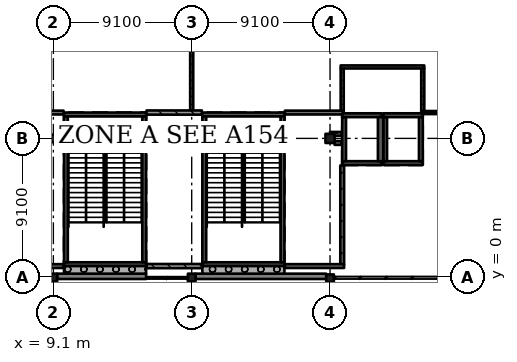
"""IFC4 building model, lengths in metres.
Left out: names, types, materials, properties, quantities, classifications, styles, units other than length and angle.
Written with IfcOpenShell. Run it as: python <this file> out.ifc"""

import sys

from ifc_helpers import new_model, si_unit, direction, frame, frame_2d, origin, origin_2d, place, context, subcontext, project, spatial, rectangle, extrude, element, fill, save


model = new_model("IFC4")
c1 = context("Model", 3, precision=1e-05, world=origin(), true_north=direction((0.0, 1.0)))
c2 = subcontext(c1, "Body", "Model", "MODEL_VIEW")
j1 = project(units=[si_unit("LENGTHUNIT", "METRE"), si_unit("PLANEANGLEUNIT", "RADIAN")], contexts=[c1])
p1 = place(None, origin())
s1 = spatial("IfcSite", under=j1, at=p1, CompositionType="ELEMENT")
p2 = place(p1, origin())
s2 = spatial("IfcBuilding", under=s1, at=p2, CompositionType="ELEMENT")
p3 = place(p2, frame((0.0, 0.0, 20.02)))
s3 = spatial("IfcBuildingStorey", under=s2, at=p3, CompositionType="ELEMENT", Elevation=20.02)
for number, where, z_axis, x_axis in (
    (1, (9.1, -0.05, 0.0), (0.0, 0.0, 1.0), (1.0, 0.0, 0.0)),
    (2, (9.1, 9.1, 0.0), (0.0, 0.0, 1.0), (1.0, 0.0, 0.0)),
    (3, (18.2, -0.05, 0.0), (0.0, 0.0, 1.0), (1.0, 0.0, 0.0)),
    (4, (18.2, 9.1, 0.0), (0.0, 0.0, 1.0), (1.0, 0.0, 0.0)),
    (5, (27.3, -0.1, 0.0), (0.0, 0.0, 1.0), (1.0, 0.0, 0.0)),
):
    element("IfcColumn", number, at=place(p3, frame(where, z_axis=z_axis, x_axis=x_axis)), inside=s3, PredefinedType="COLUMN", context=c2, shape_type="SweptSolid", body=[
        extrude(rectangle(XDim=0.5, YDim=0.5, at=origin_2d()), origin(), (0.0, 0.0, 1.0), 4.55),
    ])
p4 = place(p3, frame((27.3, 9.1, 0.0), z_axis=(0.0, 0.0, 1.0), x_axis=(1.0, 0.0, 0.0)))
e6 = element("IfcColumn", 6, at=p4, inside=s3, PredefinedType="COLUMN", context=c2, shape_type="SweptSolid", body=[
    extrude(rectangle(XDim=0.6, YDim=0.6, at=origin_2d()), origin(), (0.0, 0.0, 1.0), 4.55),
])
p5 = place(p3, frame((30.7, 7.475, 0.0), z_axis=(0.0, 0.0, 1.0), x_axis=(-1.0, 0.0, 0.0)))
e7 = element("IfcWall", 7, at=p5, inside=s3, PredefinedType="SHEAR", context=c2, shape_type="SweptSolid", body=[
    extrude(rectangle(XDim=2.6, YDim=0.25, at=frame_2d((1.3, 0.0))), origin(), (0.0, 0.0, 1.0), 4.55),
])
p6 = place(p3, frame((30.7, 10.625, 0.0), z_axis=(0.0, 0.0, 1.0), x_axis=(-1.0, 0.0, 0.0)))
e8 = element("IfcWall", 8, at=p6, inside=s3, PredefinedType="SHEAR", context=c2, shape_type="SweptSolid", body=[
    extrude(rectangle(XDim=2.6, YDim=0.25, at=frame_2d((1.3, 0.0))), origin(), (0.0, 0.0, 1.0), 4.55),
])
p7 = place(p6, frame((0.8, 0.0, 0.0)))
e9 = element("IfcOpeningElement", 9, at=p7, cuts=e8, PredefinedType="OPENING", context=c2, shape_type="SweptSolid", body=[
    extrude(rectangle(XDim=1.0, YDim=2.1, at=frame_2d((0.5, 1.05))), frame((0.0, 0.135, 0.0), z_axis=(0.0, -1.0, 0.0), x_axis=(1.0, 0.0, 0.0)), (0.0, 0.0, 1.0), 0.27),
])
p8 = place(p3, frame((28.225, 10.5, 0.0), z_axis=(0.0, 0.0, 1.0), x_axis=(0.0, -1.0, 0.0)))
e10 = element("IfcWall", 10, at=p8, inside=s3, PredefinedType="SHEAR", context=c2, shape_type="SweptSolid", body=[
    extrude(rectangle(XDim=2.9, YDim=0.25, at=frame_2d((1.45, 0.0))), origin(), (0.0, 0.0, 1.0), 4.55),
])
p9 = place(p3, frame((30.625, 10.5, 0.0), z_axis=(0.0, 0.0, 1.0), x_axis=(0.0, -1.0, 0.0)))
e11 = element("IfcWall", 11, at=p9, inside=s3, PredefinedType="SHEAR", context=c2, shape_type="SweptSolid", body=[
    extrude(rectangle(XDim=2.9, YDim=0.35, at=frame_2d((1.45, 0.0))), origin(), (0.0, 0.0, 1.0), 4.55),
])
p10 = place(p3, frame((33.4, 7.475, 0.0), z_axis=(0.0, 0.0, 1.0), x_axis=(-1.0, 0.0, 0.0)))
e12 = element("IfcWall", 12, at=p10, inside=s3, PredefinedType="SHEAR", context=c2, shape_type="SweptSolid", body=[
    extrude(rectangle(XDim=2.6, YDim=0.25, at=frame_2d((1.3, 0.0))), origin(), (0.0, 0.0, 1.0), 4.55),
])
p11 = place(p3, frame((33.4, 10.625, 0.0), z_axis=(0.0, 0.0, 1.0), x_axis=(-1.0, 0.0, 0.0)))
e13 = element("IfcWall", 13, at=p11, inside=s3, PredefinedType="SHEAR", context=c2, shape_type="SweptSolid", body=[
    extrude(rectangle(XDim=2.6, YDim=0.25, at=frame_2d((1.3, 0.0))), origin(), (0.0, 0.0, 1.0), 4.55),
])
p12 = place(p11, frame((0.8, 0.0, 0.0)))
e14 = element("IfcOpeningElement", 14, at=p12, cuts=e13, PredefinedType="OPENING", context=c2, shape_type="SweptSolid", body=[
    extrude(rectangle(XDim=1.0, YDim=2.1, at=frame_2d((0.5, 1.05))), frame((0.0, 0.135, 0.0), z_axis=(0.0, -1.0, 0.0), x_axis=(1.0, 0.0, 0.0)), (0.0, 0.0, 1.0), 0.27),
])
for number, where, z_axis, x_axis in (
    (15, (30.925, 10.5, 0.0), (0.0, 0.0, 1.0), (0.0, -1.0, 0.0)),
    (16, (33.275, 10.5, 0.0), (0.0, 0.0, 1.0), (0.0, -1.0, 0.0)),
):
    element("IfcWall", number, at=place(p3, frame(where, z_axis=z_axis, x_axis=x_axis)), inside=s3, PredefinedType="SHEAR", context=c2, shape_type="SweptSolid", body=[
        extrude(rectangle(XDim=2.9, YDim=0.25, at=frame_2d((1.45, 0.0))), origin(), (0.0, 0.0, 1.0), 4.55),
    ])
p13 = place(p3, frame((15.2, 0.825, 0.0), z_axis=(0.0, 0.0, 1.0), x_axis=(-1.0, 0.0, 0.0)))
e17 = element("IfcWall", 17, at=p13, inside=s3, PredefinedType="SHEAR", context=c2, shape_type="SweptSolid", body=[
    extrude(rectangle(XDim=5.4, YDim=0.25, at=frame_2d((2.7, 0.0))), origin(), (0.0, 0.0, 1.0), 4.55),
])
p14 = place(p3, frame((15.2, 10.675, 0.0), z_axis=(0.0, 0.0, 1.0), x_axis=(-1.0, 0.0, 0.0)))
e18 = element("IfcWall", 18, at=p14, inside=s3, PredefinedType="SHEAR", context=c2, shape_type="SweptSolid", body=[
    extrude(rectangle(XDim=5.4, YDim=0.25, at=frame_2d((2.7, 0.0))), origin(), (0.0, 0.0, 1.0), 4.55),
])
p15 = place(p14, frame((1.5, 0.0, 0.0)))
e19 = element("IfcOpeningElement", 19, at=p15, cuts=e18, PredefinedType="OPENING", context=c2, shape_type="SweptSolid", body=[
    extrude(rectangle(XDim=2.4, YDim=2.1, at=frame_2d((1.2, 1.05))), frame((0.0, 0.135, 0.0), z_axis=(0.0, -1.0, 0.0), x_axis=(1.0, 0.0, 0.0)), (0.0, 0.0, 1.0), 0.27),
])
for number, where, z_axis, x_axis in (
    (20, (9.925, 10.55, 0.0), (0.0, 0.0, 1.0), (0.0, -1.0, 0.0)),
    (21, (15.075, 10.55, 0.0), (0.0, 0.0, 1.0), (0.0, -1.0, 0.0)),
):
    element("IfcWall", number, at=place(p3, frame(where, z_axis=z_axis, x_axis=x_axis)), inside=s3, PredefinedType="SHEAR", context=c2, shape_type="SweptSolid", body=[
        extrude(rectangle(XDim=9.6, YDim=0.25, at=frame_2d((4.8, 0.0))), origin(), (0.0, 0.0, 1.0), 4.55),
    ])
p16 = place(p3, frame((24.3, 0.825, 0.0), z_axis=(0.0, 0.0, 1.0), x_axis=(-1.0, 0.0, 0.0)))
e22 = element("IfcWall", 22, at=p16, inside=s3, PredefinedType="SHEAR", context=c2, shape_type="SweptSolid", body=[
    extrude(rectangle(XDim=5.4, YDim=0.25, at=frame_2d((2.7, 0.0))), origin(), (0.0, 0.0, 1.0), 4.55),
])
p17 = place(p3, frame((24.3, 10.675, 0.0), z_axis=(0.0, 0.0, 1.0), x_axis=(-1.0, 0.0, 0.0)))
e23 = element("IfcWall", 23, at=p17, inside=s3, PredefinedType="SHEAR", context=c2, shape_type="SweptSolid", body=[
    extrude(rectangle(XDim=5.4, YDim=0.25, at=frame_2d((2.7, 0.0))), origin(), (0.0, 0.0, 1.0), 4.55),
])
p18 = place(p17, frame((1.5, 0.0, 0.0)))
e24 = element("IfcOpeningElement", 24, at=p18, cuts=e23, PredefinedType="OPENING", context=c2, shape_type="SweptSolid", body=[
    extrude(rectangle(XDim=2.4, YDim=2.1, at=frame_2d((1.2, 1.05))), frame((0.0, 0.135, 0.0), z_axis=(0.0, -1.0, 0.0), x_axis=(1.0, 0.0, 0.0)), (0.0, 0.0, 1.0), 0.27),
])
for number, where, z_axis, x_axis in (
    (25, (19.025, 10.55, 0.0), (0.0, 0.0, 1.0), (0.0, -1.0, 0.0)),
    (26, (24.175, 10.55, 0.0), (0.0, 0.0, 1.0), (0.0, -1.0, 0.0)),
):
    element("IfcWall", number, at=place(p3, frame(where, z_axis=z_axis, x_axis=x_axis)), inside=s3, PredefinedType="SHEAR", context=c2, shape_type="SweptSolid", body=[
        extrude(rectangle(XDim=9.6, YDim=0.25, at=frame_2d((4.8, 0.0))), origin(), (0.0, 0.0, 1.0), 4.55),
    ])
p19 = place(p3, frame((9.35, 0.025, 0.0), z_axis=(0.0, 0.0, 1.0), x_axis=(1.0, 0.0, 0.0)))
e27 = element("IfcWall", 27, at=p19, inside=s3, PredefinedType="SOLIDWALL", context=c2, shape_type="SweptSolid", body=[
    extrude(rectangle(XDim=5.85, YDim=0.35, at=frame_2d((2.925, 0.0))), origin(), (0.0, 0.0, 1.0), 3.5),
])
p20 = place(p3, frame((18.45, 0.025, 0.0), z_axis=(0.0, 0.0, 1.0), x_axis=(1.0, 0.0, 0.0)))
e28 = element("IfcWall", 28, at=p20, inside=s3, PredefinedType="SOLIDWALL", context=c2, shape_type="SweptSolid", body=[
    extrude(rectangle(XDim=8.6, YDim=0.35, at=frame_2d((4.3, 0.0))), origin(), (0.0, 0.0, 1.0), 3.5),
])
p21 = place(p3, frame((9.8, 0.45, 0.0), z_axis=(0.0, 0.0, 1.0), x_axis=(1.0, 0.0, 0.0)))
e29 = element("IfcWall", 29, at=p21, inside=s3, PredefinedType="SOLIDWALL", context=c2, shape_type="SweptSolid", body=[
    extrude(rectangle(XDim=5.4, YDim=0.5, at=frame_2d((2.7, 0.0))), origin(), (0.0, 0.0, 1.0), 4.25),
])
p22 = place(p3, frame((18.9, 0.45, 0.0), z_axis=(0.0, 0.0, 1.0), x_axis=(1.0, 0.0, 0.0)))
e30 = element("IfcWall", 30, at=p22, inside=s3, PredefinedType="SOLIDWALL", context=c2, shape_type="SweptSolid", body=[
    extrude(rectangle(XDim=5.4, YDim=0.5, at=frame_2d((2.7, 0.0))), origin(), (0.0, 0.0, 1.0), 4.25),
])
p23 = place(p3, frame((9.35, 8.85, 0.0), z_axis=(0.0, 0.0, 1.0), x_axis=(1.0, 0.0, 0.0)))
e31 = element("IfcWall", 31, at=p23, inside=s3, PredefinedType="SOLIDWALL", context=c2, shape_type="SweptSolid", body=[
    extrude(rectangle(XDim=0.42, YDim=0.25, at=frame_2d((0.21, 0.0))), origin(), (0.0, 0.0, 1.0), 4.25),
])
p24 = place(p3, frame((9.77, 0.7, 0.0), z_axis=(0.0, 0.0, 1.0), x_axis=(-1.0, 0.0, 0.0)))
e32 = element("IfcWall", 32, at=p24, inside=s3, PredefinedType="SOLIDWALL", context=c2, shape_type="SweptSolid", body=[
    extrude(rectangle(XDim=3.64, YDim=0.25, at=frame_2d((1.82, 0.0))), origin(), (0.0, 0.0, 1.0), 4.25),
])
p25 = place(p3, frame((9.77, 9.35, 0.0), z_axis=(0.0, 0.0, 1.0), x_axis=(-1.0, 0.0, 0.0)))
e33 = element("IfcWall", 33, at=p25, inside=s3, PredefinedType="SOLIDWALL", context=c2, shape_type="SweptSolid", body=[
    extrude(rectangle(XDim=0.42, YDim=0.25, at=frame_2d((0.21, 0.0))), origin(), (0.0, 0.0, 1.0), 4.25),
])
p26 = place(p3, frame((9.77, 10.8, 0.0), z_axis=(0.0, 0.0, 1.0), x_axis=(-1.0, 0.0, 0.0)))
e34 = element("IfcWall", 34, at=p26, inside=s3, PredefinedType="SOLIDWALL", context=c2, shape_type="SweptSolid", body=[
    extrude(rectangle(XDim=3.64, YDim=0.25, at=frame_2d((1.82, 0.0))), origin(), (0.0, 0.0, 1.0), 4.25),
])
p27 = place(p26, frame((1.35, 0.0, 0.0)))
e35 = element("IfcOpeningElement", 35, at=p27, cuts=e34, PredefinedType="OPENING", context=c2, shape_type="SweptSolid", body=[
    extrude(rectangle(XDim=1.0, YDim=2.1, at=frame_2d((0.5, 1.05))), frame((0.0, 0.135, 0.0), z_axis=(0.0, -1.0, 0.0), x_axis=(1.0, 0.0, 0.0)), (0.0, 0.0, 1.0), 0.27),
])
p28 = place(p3, frame((15.23, 10.8, 0.0), z_axis=(0.0, 0.0, 1.0), x_axis=(1.0, 0.0, 0.0)))
e36 = element("IfcWall", 36, at=p28, inside=s3, PredefinedType="SOLIDWALL", context=c2, shape_type="SweptSolid", body=[
    extrude(rectangle(XDim=3.64, YDim=0.275, at=frame_2d((1.82, 0.0))), origin(), (0.0, 0.0, 1.0), 4.25),
])
p29 = place(p28, frame((0.92, 0.0, 0.0)))
e37 = element("IfcOpeningElement", 37, at=p29, cuts=e36, PredefinedType="OPENING", context=c2, shape_type="SweptSolid", body=[
    extrude(rectangle(XDim=1.2, YDim=2.4, at=frame_2d((0.6, 1.2))), frame((0.0, 0.147, 0.0), z_axis=(0.0, -1.0, 0.0), x_axis=(1.0, 0.0, 0.0)), (0.0, 0.0, 1.0), 0.295),
])
p30 = place(p3, frame((18.2, 17.9, 0.0), z_axis=(0.0, 0.0, 1.0), x_axis=(0.0, -1.0, 0.0)))
e38 = element("IfcWall", 38, at=p30, inside=s3, PredefinedType="PARTITIONING", context=c2, shape_type="SweptSolid", body=[
    extrude(rectangle(XDim=6.962, YDim=0.2, at=frame_2d((3.481, 0.0))), origin(), (0.0, 0.0, 1.0), 3.5),
])
p31 = place(p30, frame((0.85, 0.0, 0.0)))
e39 = element("IfcOpeningElement", 39, at=p31, cuts=e38, PredefinedType="OPENING", context=c2, shape_type="SweptSolid", body=[
    extrude(rectangle(XDim=1.8, YDim=2.4, at=frame_2d((0.9, 1.2))), frame((0.0, 0.11, 0.0), z_axis=(0.0, -1.0, 0.0), x_axis=(1.0, 0.0, 0.0)), (0.0, 0.0, 1.0), 0.22),
])
p32 = place(p30, frame((4.35, 0.0, 0.0)))
e40 = element("IfcOpeningElement", 40, at=p32, cuts=e38, PredefinedType="OPENING", context=c2, shape_type="SweptSolid", body=[
    extrude(rectangle(XDim=1.8, YDim=2.4, at=frame_2d((0.9, 1.2))), frame((0.0, 0.11, 0.0), z_axis=(0.0, -1.0, 0.0), x_axis=(1.0, 0.0, 0.0)), (0.0, 0.0, 1.0), 0.22),
])
p33 = place(p3, frame((18.45, 8.85, 0.0), z_axis=(0.0, 0.0, 1.0), x_axis=(1.0, 0.0, 0.0)))
e41 = element("IfcWall", 41, at=p33, inside=s3, PredefinedType="SOLIDWALL", context=c2, shape_type="SweptSolid", body=[
    extrude(rectangle(XDim=0.42, YDim=0.275, at=frame_2d((0.21, 0.0))), origin(), (0.0, 0.0, 1.0), 4.25),
])
p34 = place(p3, frame((18.87, 0.7, 0.0), z_axis=(0.0, 0.0, 1.0), x_axis=(-1.0, 0.0, 0.0)))
e42 = element("IfcWall", 42, at=p34, inside=s3, PredefinedType="SOLIDWALL", context=c2, shape_type="SweptSolid", body=[
    extrude(rectangle(XDim=3.64, YDim=0.275, at=frame_2d((1.82, 0.0))), origin(), (0.0, 0.0, 1.0), 4.25),
])
p35 = place(p3, frame((18.87, 9.35, 0.0), z_axis=(0.0, 0.0, 1.0), x_axis=(-1.0, 0.0, 0.0)))
e43 = element("IfcWall", 43, at=p35, inside=s3, PredefinedType="SOLIDWALL", context=c2, shape_type="SweptSolid", body=[
    extrude(rectangle(XDim=0.42, YDim=0.275, at=frame_2d((0.21, 0.0))), origin(), (0.0, 0.0, 1.0), 4.25),
])
p36 = place(p3, frame((27.3, 9.4, 0.0), z_axis=(0.0, 0.0, 1.0), x_axis=(1.0, 0.0, 0.0)))
e44 = element("IfcWall", 44, at=p36, inside=s3, PredefinedType="SOLIDWALL", context=c2, shape_type="SweptSolid", body=[
    extrude(rectangle(XDim=0.77, YDim=0.25, at=frame_2d((0.385, 0.0))), origin(), (0.0, 0.0, 1.0), 4.25),
])
p37 = place(p3, frame((27.6, 8.8, 0.0), z_axis=(0.0, 0.0, 1.0), x_axis=(1.0, 0.0, 0.0)))
e45 = element("IfcWall", 45, at=p37, inside=s3, PredefinedType="SOLIDWALL", context=c2, shape_type="SweptSolid", body=[
    extrude(rectangle(XDim=0.47, YDim=0.25, at=frame_2d((0.235, 0.0))), origin(), (0.0, 0.0, 1.0), 4.25),
])
p38 = place(p3, frame((28.1, 7.32, 0.0), z_axis=(0.0, 0.0, 1.0), x_axis=(0.0, -1.0, 0.0)))
e46 = element("IfcWall", 46, at=p38, inside=s3, PredefinedType="SOLIDWALL", context=c2, shape_type="SweptSolid", body=[
    extrude(rectangle(XDim=6.495, YDim=0.25, at=frame_2d((3.248, 0.0))), origin(), (0.0, 0.0, 1.0), 4.25),
])
p39 = place(p3, frame((28.1, 13.7, 0.0), z_axis=(0.0, 0.0, 1.0), x_axis=(0.0, -1.0, 0.0)))
e47 = element("IfcWall", 47, at=p39, inside=s3, PredefinedType="PARTITIONING", context=c2, shape_type="SweptSolid", body=[
    extrude(rectangle(XDim=2.775, YDim=0.2, at=frame_2d((1.387, 0.0))), origin(), (0.0, 0.0, 1.0), 4.25),
])
p40 = place(p39, frame((0.45, 0.0, 0.0)))
e48 = element("IfcOpeningElement", 48, at=p40, cuts=e47, PredefinedType="OPENING", context=c2, shape_type="SweptSolid", body=[
    extrude(rectangle(XDim=1.8, YDim=2.4, at=frame_2d((0.9, 1.2))), frame((0.0, 0.11, 0.0), z_axis=(0.0, -1.0, 0.0), x_axis=(1.0, 0.0, 0.0)), (0.0, 0.0, 1.0), 0.22),
])
p41 = place(p3, frame((28.2, 10.8, 0.0), z_axis=(0.0, 0.0, 1.0), x_axis=(-1.0, 0.0, 0.0)))
e49 = element("IfcWall", 49, at=p41, inside=s3, PredefinedType="SOLIDWALL", context=c2, shape_type="SweptSolid", body=[
    extrude(rectangle(XDim=3.87, YDim=0.25, at=frame_2d((1.935, 0.0))), origin(), (0.0, 0.0, 1.0), 4.25),
])
p42 = place(p41, frame((1.55, 0.0, 0.0)))
e50 = element("IfcOpeningElement", 50, at=p42, cuts=e49, PredefinedType="OPENING", context=c2, shape_type="SweptSolid", body=[
    extrude(rectangle(XDim=0.8, YDim=2.1, at=frame_2d((0.4, 1.05))), frame((0.0, 0.135, 0.0), z_axis=(0.0, -1.0, 0.0), x_axis=(1.0, 0.0, 0.0)), (0.0, 0.0, 1.0), 0.27),
])
p43 = place(p3, frame((28.225, 0.7, 0.0), z_axis=(0.0, 0.0, 1.0), x_axis=(-1.0, 0.0, 0.0)))
e51 = element("IfcWall", 51, at=p43, inside=s3, PredefinedType="SOLIDWALL", context=c2, shape_type="SweptSolid", body=[
    extrude(rectangle(XDim=3.895, YDim=0.25, at=frame_2d((1.948, 0.0))), origin(), (0.0, 0.0, 1.0), 4.25),
])
p44 = place(p3, frame((33.4, 10.9, 0.0), z_axis=(0.0, 0.0, 1.0), x_axis=(0.0, 1.0, 0.0)))
e52 = element("IfcWall", 52, at=p44, inside=s3, PredefinedType="PARTITIONING", context=c2, shape_type="SweptSolid", body=[
    extrude(rectangle(XDim=2.8, YDim=0.2, at=frame_2d((1.4, 0.0))), origin(), (0.0, 0.0, 1.0), 4.25),
])
p45 = place(p44, frame((0.55, 0.0, 0.0)))
e53 = element("IfcOpeningElement", 53, at=p45, cuts=e52, PredefinedType="OPENING", context=c2, shape_type="SweptSolid", body=[
    extrude(rectangle(XDim=1.8, YDim=2.4, at=frame_2d((0.9, 1.2))), frame((0.0, 0.11, 0.0), z_axis=(0.0, -1.0, 0.0), x_axis=(1.0, 0.0, 0.0)), (0.0, 0.0, 1.0), 0.22),
])
p46 = place(p3, frame((33.5, 13.8, 0.0), z_axis=(0.0, 0.0, 1.0), x_axis=(-1.0, 0.0, 0.0)))
e54 = element("IfcWall", 54, at=p46, inside=s3, PredefinedType="PARTITIONING", context=c2, shape_type="SweptSolid", body=[
    extrude(rectangle(XDim=5.5, YDim=0.2, at=frame_2d((2.75, 0.0))), origin(), (0.0, 0.0, 1.0), 4.25),
])
p47 = place(p46, frame((1.85, 0.0, 0.0)))
e55 = element("IfcOpeningElement", 55, at=p47, cuts=e54, PredefinedType="OPENING", context=c2, shape_type="SweptSolid", body=[
    extrude(rectangle(XDim=1.8, YDim=2.4, at=frame_2d((0.9, 1.2))), frame((0.0, 0.11, 0.0), z_axis=(0.0, -1.0, 0.0), x_axis=(1.0, 0.0, 0.0)), (0.0, 0.0, 1.0), 0.22),
])
p48 = place(p3, frame((36.2, 10.8, 0.0), z_axis=(0.0, 0.0, 1.0), x_axis=(-1.0, 0.0, 0.0)))
e56 = element("IfcWall", 56, at=p48, inside=s3, PredefinedType="PARTITIONING", context=c2, shape_type="SweptSolid", body=[
    extrude(rectangle(XDim=2.9, YDim=0.2, at=frame_2d((1.45, 0.0))), origin(), (0.0, 0.0, 1.0), 4.25),
])
p49 = place(p48, frame((0.55, 0.0, 0.0)))
e57 = element("IfcOpeningElement", 57, at=p49, cuts=e56, PredefinedType="OPENING", context=c2, shape_type="SweptSolid", body=[
    extrude(rectangle(XDim=1.8, YDim=2.4, at=frame_2d((0.9, 1.2))), frame((0.0, 0.11, 0.0), z_axis=(0.0, -1.0, 0.0), x_axis=(1.0, 0.0, 0.0)), (0.0, 0.0, 1.0), 0.22),
])
p50 = place(p29, origin())
e58 = element("IfcDoor", 58, at=p50, inside=s3, OperationType="SINGLE_SWING_RIGHT", PredefinedType="DOOR", context=c2, shape_type="SweptSolid", body=[
    extrude(rectangle(XDim=1.2, YDim=2.4, at=frame_2d((0.6, 1.2))), frame((0.0, 0.025, 0.0), z_axis=(0.0, -1.0, 0.0), x_axis=(1.0, 0.0, 0.0)), (0.0, 0.0, 1.0), 0.05),
])
fill(e37, e58)
p51 = place(p42, origin())
e59 = element("IfcDoor", 59, at=p51, inside=s3, OperationType="SINGLE_SWING_LEFT", PredefinedType="DOOR", context=c2, shape_type="SweptSolid", body=[
    extrude(rectangle(XDim=0.8, YDim=2.1, at=frame_2d((0.4, 1.05))), frame((0.0, 0.025, 0.0), z_axis=(0.0, -1.0, 0.0), x_axis=(1.0, 0.0, 0.0)), (0.0, 0.0, 1.0), 0.05),
])
fill(e50, e59)
p52 = place(p32, origin())
e60 = element("IfcDoor", 60, at=p52, inside=s3, OperationType="DOUBLE_DOOR_SINGLE_SWING", PredefinedType="DOOR", context=c2, shape_type="SweptSolid", body=[
    extrude(rectangle(XDim=1.8, YDim=2.4, at=frame_2d((0.9, 1.2))), frame((0.0, 0.025, 0.0), z_axis=(0.0, -1.0, 0.0), x_axis=(1.0, 0.0, 0.0)), (0.0, 0.0, 1.0), 0.05),
])
fill(e40, e60)
p53 = place(p47, origin())
e61 = element("IfcDoor", 61, at=p53, inside=s3, OperationType="DOUBLE_DOOR_SINGLE_SWING", PredefinedType="DOOR", context=c2, shape_type="SweptSolid", body=[
    extrude(rectangle(XDim=1.8, YDim=2.4, at=frame_2d((0.9, 1.2))), frame((0.0, 0.025, 0.0), z_axis=(0.0, -1.0, 0.0), x_axis=(1.0, 0.0, 0.0)), (0.0, 0.0, 1.0), 0.05),
])
fill(e55, e61)
p54 = place(p45, origin())
e62 = element("IfcDoor", 62, at=p54, inside=s3, OperationType="DOUBLE_DOOR_SINGLE_SWING", PredefinedType="DOOR", context=c2, shape_type="SweptSolid", body=[
    extrude(rectangle(XDim=1.8, YDim=2.4, at=frame_2d((0.9, 1.2))), frame((0.0, 0.025, 0.0), z_axis=(0.0, -1.0, 0.0), x_axis=(1.0, 0.0, 0.0)), (0.0, 0.0, 1.0), 0.05),
])
fill(e53, e62)
p55 = place(p40, origin())
e63 = element("IfcDoor", 63, at=p55, inside=s3, OperationType="DOUBLE_DOOR_SINGLE_SWING", PredefinedType="DOOR", context=c2, shape_type="SweptSolid", body=[
    extrude(rectangle(XDim=1.8, YDim=2.4, at=frame_2d((0.9, 1.2))), frame((0.0, 0.025, 0.0), z_axis=(0.0, -1.0, 0.0), x_axis=(1.0, 0.0, 0.0)), (0.0, 0.0, 1.0), 0.05),
])
fill(e48, e63)
p56 = place(p49, origin())
e64 = element("IfcDoor", 64, at=p56, inside=s3, OperationType="DOUBLE_DOOR_SINGLE_SWING", PredefinedType="DOOR", context=c2, shape_type="SweptSolid", body=[
    extrude(rectangle(XDim=1.8, YDim=2.4, at=frame_2d((0.9, 1.2))), frame((0.0, 0.025, 0.0), z_axis=(0.0, -1.0, 0.0), x_axis=(1.0, 0.0, 0.0)), (0.0, 0.0, 1.0), 0.05),
])
fill(e57, e64)
p57 = place(p15, origin())
e65 = element("IfcDoor", 65, at=p57, inside=s3, OperationType="DOUBLE_DOOR_SINGLE_SWING", PredefinedType="DOOR", context=c2, shape_type="SweptSolid", body=[
    extrude(rectangle(XDim=2.4, YDim=2.1, at=frame_2d((1.2, 1.05))), frame((0.0, 0.025, 0.0), z_axis=(0.0, -1.0, 0.0), x_axis=(1.0, 0.0, 0.0)), (0.0, 0.0, 1.0), 0.05),
])
fill(e19, e65)
p58 = place(p18, origin())
e66 = element("IfcDoor", 66, at=p58, inside=s3, OperationType="DOUBLE_DOOR_SINGLE_SWING", PredefinedType="DOOR", context=c2, shape_type="SweptSolid", body=[
    extrude(rectangle(XDim=2.4, YDim=2.1, at=frame_2d((1.2, 1.05))), frame((0.0, 0.025, 0.0), z_axis=(0.0, -1.0, 0.0), x_axis=(1.0, 0.0, 0.0)), (0.0, 0.0, 1.0), 0.05),
])
fill(e24, e66)
p59 = place(p7, origin())
e67 = element("IfcDoor", 67, at=p59, inside=s3, OperationType="DOUBLE_DOOR_SLIDING", PredefinedType="DOOR", context=c2, shape_type="SweptSolid", body=[
    extrude(rectangle(XDim=1.0, YDim=2.1, at=frame_2d((0.5, 1.05))), frame((0.0, 0.025, 0.0), z_axis=(0.0, -1.0, 0.0), x_axis=(1.0, 0.0, 0.0)), (0.0, 0.0, 1.0), 0.05),
])
fill(e9, e67)
p60 = place(p12, origin())
e68 = element("IfcDoor", 68, at=p60, inside=s3, OperationType="DOUBLE_DOOR_SLIDING", PredefinedType="DOOR", context=c2, shape_type="SweptSolid", body=[
    extrude(rectangle(XDim=1.0, YDim=2.1, at=frame_2d((0.5, 1.05))), frame((0.0, 0.025, 0.0), z_axis=(0.0, -1.0, 0.0), x_axis=(1.0, 0.0, 0.0)), (0.0, 0.0, 1.0), 0.05),
])
fill(e14, e68)
save(model, sys.argv[1])
